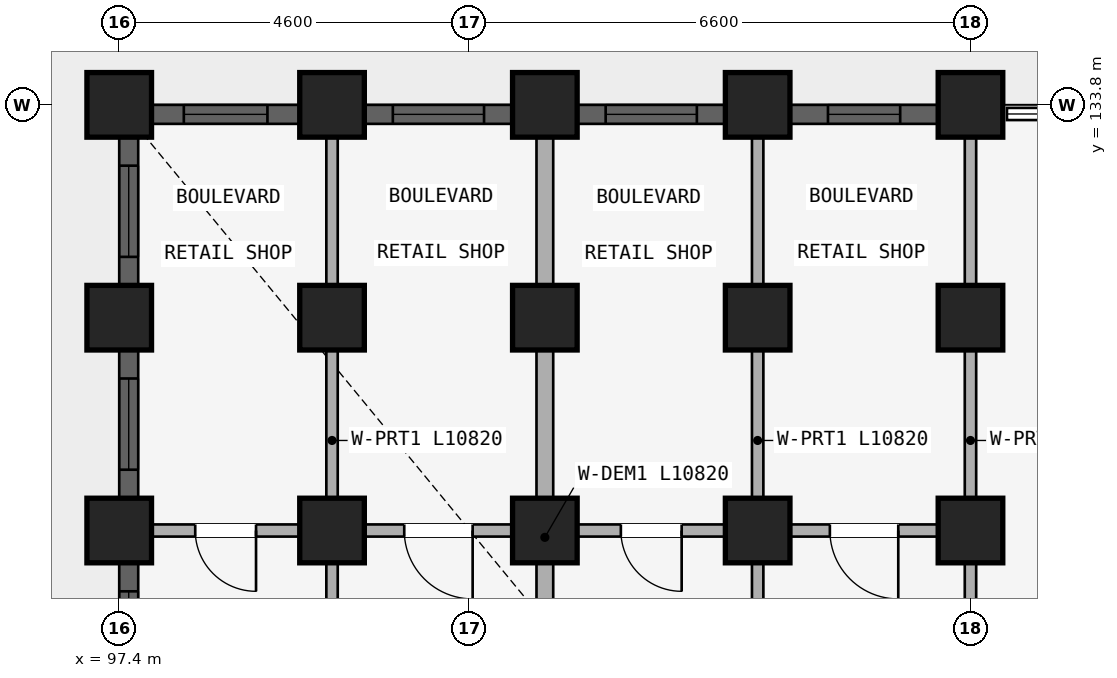
"""IFC4 building model, lengths in metres.
Left out: names, types, materials, properties, quantities, classifications, styles, units other than length and angle.
Written with IfcOpenShell. Run it as: python <this file> out.ifc"""

import sys

from ifc_helpers import new_model, si_unit, direction, frame, frame_2d, origin, origin_2d, place, context, subcontext, project, spatial, rectangle, extrude, element, fill, save


model = new_model("IFC4")
c1 = context("Model", 3, precision=1e-05, world=origin(), true_north=direction((0.0, 1.0)))
c2 = subcontext(c1, "Body", "Model", "MODEL_VIEW")
j1 = project(units=[si_unit("LENGTHUNIT", "METRE"), si_unit("PLANEANGLEUNIT", "RADIAN")], contexts=[c1])
p1 = place(None, origin())
s1 = spatial("IfcSite", under=j1, at=p1, CompositionType="ELEMENT")
p2 = place(p1, origin())
s2 = spatial("IfcBuilding", under=s1, at=p2, CompositionType="ELEMENT")
p3 = place(p2, origin())
s3 = spatial("IfcBuildingStorey", under=s2, at=p3, CompositionType="ELEMENT", Elevation=0.0)
for number, where, z_axis, x_axis in (
    (1, (108.6, 128.2, 0.0), (0.0, 0.0, 1.0), (1.0, 0.0, 0.0)),
    (2, (108.6, 131.0, 0.0), (0.0, 0.0, 1.0), (1.0, 0.0, 0.0)),
    (3, (108.6, 133.8, 0.0), (0.0, 0.0, 1.0), (1.0, 0.0, 0.0)),
    (4, (105.8, 128.2, 0.0), (0.0, 0.0, 1.0), (1.0, 0.0, 0.0)),
    (5, (105.8, 131.0, 0.0), (0.0, 0.0, 1.0), (1.0, 0.0, 0.0)),
    (6, (105.8, 133.8, 0.0), (0.0, 0.0, 1.0), (1.0, 0.0, 0.0)),
    (7, (103.0, 128.2, 0.0), (0.0, 0.0, 1.0), (1.0, 0.0, 0.0)),
    (8, (103.0, 131.0, 0.0), (0.0, 0.0, 1.0), (1.0, 0.0, 0.0)),
    (9, (103.0, 133.8, 0.0), (0.0, 0.0, 1.0), (1.0, 0.0, 0.0)),
    (10, (100.2, 128.2, 0.0), (0.0, 0.0, 1.0), (1.0, 0.0, 0.0)),
    (11, (100.2, 131.0, 0.0), (0.0, 0.0, 1.0), (1.0, 0.0, 0.0)),
    (12, (100.2, 133.8, 0.0), (0.0, 0.0, 1.0), (1.0, 0.0, 0.0)),
    (13, (97.4, 128.2, 0.0), (0.0, 0.0, 1.0), (1.0, 0.0, 0.0)),
    (14, (97.4, 131.0, 0.0), (0.0, 0.0, 1.0), (1.0, 0.0, 0.0)),
    (15, (97.4, 133.8, 0.0), (0.0, 0.0, 1.0), (1.0, 0.0, 0.0)),
):
    element("IfcColumn", number, at=place(p3, frame(where, z_axis=z_axis, x_axis=x_axis)), inside=s3, PredefinedType="COLUMN", context=c2, shape_type="SweptSolid", body=[
        extrude(rectangle(XDim=0.85, YDim=0.85, at=origin_2d()), origin(), (0.0, 0.0, 1.0), 4.15),
    ])
p4 = place(p3, frame((108.52, 128.2, 0.0), z_axis=(0.0, 0.0, 1.0), x_axis=(-1.0, 0.0, 0.0)))
e16 = element("IfcWall", 16, at=p4, inside=s3, PredefinedType="PLUMBINGWALL", context=c2, shape_type="SweptSolid", body=[
    extrude(rectangle(XDim=2.64, YDim=0.16, at=frame_2d((1.32, 0.0))), origin(), (0.0, 0.0, 1.0), 3.492),
])
p5 = place(p4, frame((0.87, 0.0, 0.0)))
e17 = element("IfcOpeningElement", 17, at=p5, cuts=e16, PredefinedType="OPENING", context=c2, shape_type="SweptSolid", body=[
    extrude(rectangle(XDim=0.9, YDim=2.1, at=frame_2d((0.45, 1.05))), frame((0.0, 0.09, 0.0), z_axis=(0.0, -1.0, 0.0), x_axis=(1.0, 0.0, 0.0)), (0.0, 0.0, 1.0), 0.18),
])
p6 = place(p3, frame((105.72, 128.2, 0.0), z_axis=(0.0, 0.0, 1.0), x_axis=(-1.0, 0.0, 0.0)))
e18 = element("IfcWall", 18, at=p6, inside=s3, PredefinedType="PLUMBINGWALL", context=c2, shape_type="SweptSolid", body=[
    extrude(rectangle(XDim=2.64, YDim=0.16, at=frame_2d((1.32, 0.0))), origin(), (0.0, 0.0, 1.0), 3.492),
])
p7 = place(p6, frame((0.92, 0.0, 0.0)))
e19 = element("IfcOpeningElement", 19, at=p7, cuts=e18, PredefinedType="OPENING", context=c2, shape_type="SweptSolid", body=[
    extrude(rectangle(XDim=0.8, YDim=2.1, at=frame_2d((0.4, 1.05))), frame((0.0, 0.09, 0.0), z_axis=(0.0, -1.0, 0.0), x_axis=(1.0, 0.0, 0.0)), (0.0, 0.0, 1.0), 0.18),
])
p8 = place(p3, frame((102.92, 128.2, 0.0), z_axis=(0.0, 0.0, 1.0), x_axis=(-1.0, 0.0, 0.0)))
e20 = element("IfcWall", 20, at=p8, inside=s3, PredefinedType="PLUMBINGWALL", context=c2, shape_type="SweptSolid", body=[
    extrude(rectangle(XDim=2.64, YDim=0.16, at=frame_2d((1.32, 0.0))), origin(), (0.0, 0.0, 1.0), 3.492),
])
p9 = place(p8, frame((0.87, 0.0, 0.0)))
e21 = element("IfcOpeningElement", 21, at=p9, cuts=e20, PredefinedType="OPENING", context=c2, shape_type="SweptSolid", body=[
    extrude(rectangle(XDim=0.9, YDim=2.1, at=frame_2d((0.45, 1.05))), frame((0.0, 0.09, 0.0), z_axis=(0.0, -1.0, 0.0), x_axis=(1.0, 0.0, 0.0)), (0.0, 0.0, 1.0), 0.18),
])
p10 = place(p3, frame((100.12, 128.2, 0.0), z_axis=(0.0, 0.0, 1.0), x_axis=(-1.0, 0.0, 0.0)))
e22 = element("IfcWall", 22, at=p10, inside=s3, PredefinedType="PLUMBINGWALL", context=c2, shape_type="SweptSolid", body=[
    extrude(rectangle(XDim=2.64, YDim=0.16, at=frame_2d((1.32, 0.0))), origin(), (0.0, 0.0, 1.0), 3.492),
])
p11 = place(p10, frame((0.92, 0.0, 0.0)))
e23 = element("IfcOpeningElement", 23, at=p11, cuts=e22, PredefinedType="OPENING", context=c2, shape_type="SweptSolid", body=[
    extrude(rectangle(XDim=0.8, YDim=2.1, at=frame_2d((0.4, 1.05))), frame((0.0, 0.09, 0.0), z_axis=(0.0, -1.0, 0.0), x_axis=(1.0, 0.0, 0.0)), (0.0, 0.0, 1.0), 0.18),
])
p12 = place(p3, frame((108.6, 122.7, 0.0), z_axis=(0.0, 0.0, 1.0), x_axis=(0.0, 1.0, 0.0)))
e24 = element("IfcWall", 24, at=p12, inside=s3, PredefinedType="PARTITIONING", context=c2, shape_type="SweptSolid", body=[
    extrude(rectangle(XDim=10.82, YDim=0.15, at=frame_2d((5.41, 0.0))), origin(), (0.0, 0.0, 1.0), 3.492),
])
p13 = place(p12, frame((0.899, 0.0, 0.0)))
e25 = element("IfcOpeningElement", 25, at=p13, cuts=e24, PredefinedType="OPENING", context=c2, shape_type="SweptSolid", body=[
    extrude(rectangle(XDim=0.8, YDim=2.1, at=frame_2d((0.4, 1.05))), frame((0.0, 0.085, 0.0), z_axis=(0.0, -1.0, 0.0), x_axis=(1.0, 0.0, 0.0)), (0.0, 0.0, 1.0), 0.17),
])
p14 = place(p3, frame((105.8, 122.7, 0.0), z_axis=(0.0, 0.0, 1.0), x_axis=(0.0, 1.0, 0.0)))
e26 = element("IfcWall", 26, at=p14, inside=s3, PredefinedType="PARTITIONING", context=c2, shape_type="SweptSolid", body=[
    extrude(rectangle(XDim=10.82, YDim=0.15, at=frame_2d((5.41, 0.0))), origin(), (0.0, 0.0, 1.0), 3.492),
])
p15 = place(p14, frame((0.899, 0.0, 0.0)))
e27 = element("IfcOpeningElement", 27, at=p15, cuts=e26, PredefinedType="OPENING", context=c2, shape_type="SweptSolid", body=[
    extrude(rectangle(XDim=0.8, YDim=2.1, at=frame_2d((0.4, 1.05))), frame((0.0, 0.085, 0.0), z_axis=(0.0, -1.0, 0.0), x_axis=(1.0, 0.0, 0.0)), (0.0, 0.0, 1.0), 0.17),
])
p16 = place(p3, frame((103.0, 122.7, 0.0), z_axis=(0.0, 0.0, 1.0), x_axis=(0.0, 1.0, 0.0)))
e28 = element("IfcWall", 28, at=p16, inside=s3, PredefinedType="STANDARD", context=c2, shape_type="SweptSolid", body=[
    extrude(rectangle(XDim=10.82, YDim=0.22, at=frame_2d((5.41, 0.0))), origin(), (0.0, 0.0, 1.0), 3.492),
])
p17 = place(p3, frame((100.2, 122.7, 0.0), z_axis=(0.0, 0.0, 1.0), x_axis=(0.0, 1.0, 0.0)))
e29 = element("IfcWall", 29, at=p17, inside=s3, PredefinedType="PARTITIONING", context=c2, shape_type="SweptSolid", body=[
    extrude(rectangle(XDim=10.82, YDim=0.15, at=frame_2d((5.41, 0.0))), origin(), (0.0, 0.0, 1.0), 3.492),
])
p18 = place(p17, frame((0.899, 0.0, 0.0)))
e30 = element("IfcOpeningElement", 30, at=p18, cuts=e29, PredefinedType="OPENING", context=c2, shape_type="SweptSolid", body=[
    extrude(rectangle(XDim=0.8, YDim=2.1, at=frame_2d((0.4, 1.05))), frame((0.0, 0.085, 0.0), z_axis=(0.0, -1.0, 0.0), x_axis=(1.0, 0.0, 0.0)), (0.0, 0.0, 1.0), 0.17),
])
p19 = place(p3, frame((108.171, 133.675, 0.0), z_axis=(0.0, 0.0, 1.0), x_axis=(-1.0, 0.0, 0.0)))
e31 = element("IfcWall", 31, at=p19, inside=s3, PredefinedType="STANDARD", context=c2, shape_type="SweptSolid", body=[
    extrude(rectangle(XDim=1.943, YDim=0.25, at=frame_2d((0.971, 0.0))), origin(), (0.0, 0.0, 1.0), 3.692),
])
p20 = place(p19, frame((0.497, 0.0, 0.88)))
e32 = element("IfcOpeningElement", 32, at=p20, cuts=e31, PredefinedType="OPENING", context=c2, shape_type="SweptSolid", body=[
    extrude(rectangle(XDim=0.95, YDim=1.35, at=frame_2d((0.475, 0.675))), frame((0.0, 0.135, 0.0), z_axis=(0.0, -1.0, 0.0), x_axis=(1.0, 0.0, 0.0)), (0.0, 0.0, 1.0), 0.27),
])
p21 = place(p3, frame((105.372, 133.675, 0.0), z_axis=(0.0, 0.0, 1.0), x_axis=(-1.0, 0.0, 0.0)))
e33 = element("IfcWall", 33, at=p21, inside=s3, PredefinedType="STANDARD", context=c2, shape_type="SweptSolid", body=[
    extrude(rectangle(XDim=1.943, YDim=0.25, at=frame_2d((0.972, 0.0))), origin(), (0.0, 0.0, 1.0), 3.692),
])
p22 = place(p21, frame((0.372, 0.0, 0.88)))
e34 = element("IfcOpeningElement", 34, at=p22, cuts=e33, PredefinedType="OPENING", context=c2, shape_type="SweptSolid", body=[
    extrude(rectangle(XDim=1.2, YDim=1.5, at=frame_2d((0.6, 0.75))), frame((0.0, 0.135, 0.0), z_axis=(0.0, -1.0, 0.0), x_axis=(1.0, 0.0, 0.0)), (0.0, 0.0, 1.0), 0.27),
])
p23 = place(p3, frame((102.572, 133.675, 0.0), z_axis=(0.0, 0.0, 1.0), x_axis=(-1.0, 0.0, 0.0)))
e35 = element("IfcWall", 35, at=p23, inside=s3, PredefinedType="STANDARD", context=c2, shape_type="SweptSolid", body=[
    extrude(rectangle(XDim=1.943, YDim=0.25, at=frame_2d((0.972, 0.0))), origin(), (0.0, 0.0, 1.0), 3.692),
])
p24 = place(p23, frame((0.372, 0.0, 0.88)))
e36 = element("IfcOpeningElement", 36, at=p24, cuts=e35, PredefinedType="OPENING", context=c2, shape_type="SweptSolid", body=[
    extrude(rectangle(XDim=1.2, YDim=1.5, at=frame_2d((0.6, 0.75))), frame((0.0, 0.135, 0.0), z_axis=(0.0, -1.0, 0.0), x_axis=(1.0, 0.0, 0.0)), (0.0, 0.0, 1.0), 0.27),
])
p25 = place(p3, frame((99.771, 133.675, 0.0), z_axis=(0.0, 0.0, 1.0), x_axis=(-1.0, 0.0, 0.0)))
e37 = element("IfcWall", 37, at=p25, inside=s3, PredefinedType="STANDARD", context=c2, shape_type="SweptSolid", body=[
    extrude(rectangle(XDim=1.943, YDim=0.25, at=frame_2d((0.971, 0.0))), origin(), (0.0, 0.0, 1.0), 3.692),
])
p26 = place(p25, frame((0.421, 0.0, 0.88)))
e38 = element("IfcOpeningElement", 38, at=p26, cuts=e37, PredefinedType="OPENING", context=c2, shape_type="SweptSolid", body=[
    extrude(rectangle(XDim=1.1, YDim=1.45, at=frame_2d((0.55, 0.725))), frame((0.0, 0.135, 0.0), z_axis=(0.0, -1.0, 0.0), x_axis=(1.0, 0.0, 0.0)), (0.0, 0.0, 1.0), 0.27),
])
p27 = place(p3, frame((97.525, 125.82, 0.0), z_axis=(0.0, 0.0, 1.0), x_axis=(0.0, 1.0, 0.0)))
e39 = element("IfcWall", 39, at=p27, inside=s3, PredefinedType="STANDARD", context=c2, shape_type="SweptSolid", body=[
    extrude(rectangle(XDim=1.96, YDim=0.25, at=frame_2d((0.98, 0.0))), origin(), (0.0, 0.0, 1.0), 3.492),
])
p28 = place(p27, frame((0.38, 0.0, 0.88)))
e40 = element("IfcOpeningElement", 40, at=p28, cuts=e39, PredefinedType="OPENING", context=c2, shape_type="SweptSolid", body=[
    extrude(rectangle(XDim=1.2, YDim=1.5, at=frame_2d((0.6, 0.75))), frame((0.0, 0.135, 0.0), z_axis=(0.0, -1.0, 0.0), x_axis=(1.0, 0.0, 0.0)), (0.0, 0.0, 1.0), 0.27),
])
p29 = place(p3, frame((97.525, 128.62, 0.0), z_axis=(0.0, 0.0, 1.0), x_axis=(0.0, 1.0, 0.0)))
e41 = element("IfcWall", 41, at=p29, inside=s3, PredefinedType="STANDARD", context=c2, shape_type="SweptSolid", body=[
    extrude(rectangle(XDim=1.96, YDim=0.25, at=frame_2d((0.98, 0.0))), origin(), (0.0, 0.0, 1.0), 3.492),
])
p30 = place(p29, frame((0.38, 0.0, 0.88)))
e42 = element("IfcOpeningElement", 42, at=p30, cuts=e41, PredefinedType="OPENING", context=c2, shape_type="SweptSolid", body=[
    extrude(rectangle(XDim=1.2, YDim=1.5, at=frame_2d((0.6, 0.75))), frame((0.0, 0.135, 0.0), z_axis=(0.0, -1.0, 0.0), x_axis=(1.0, 0.0, 0.0)), (0.0, 0.0, 1.0), 0.27),
])
p31 = place(p3, frame((97.525, 131.42, 0.0), z_axis=(0.0, 0.0, 1.0), x_axis=(0.0, 1.0, 0.0)))
e43 = element("IfcWall", 43, at=p31, inside=s3, PredefinedType="STANDARD", context=c2, shape_type="SweptSolid", body=[
    extrude(rectangle(XDim=1.96, YDim=0.25, at=frame_2d((0.98, 0.0))), origin(), (0.0, 0.0, 1.0), 3.492),
])
p32 = place(p31, frame((0.38, 0.0, 0.88)))
e44 = element("IfcOpeningElement", 44, at=p32, cuts=e43, PredefinedType="OPENING", context=c2, shape_type="SweptSolid", body=[
    extrude(rectangle(XDim=1.2, YDim=1.5, at=frame_2d((0.6, 0.75))), frame((0.0, 0.135, 0.0), z_axis=(0.0, -1.0, 0.0), x_axis=(1.0, 0.0, 0.0)), (0.0, 0.0, 1.0), 0.27),
])
p33 = place(p20, origin())
e45 = element("IfcWindow", 45, at=p33, inside=s3, PartitioningType="SINGLE_PANEL", PredefinedType="WINDOW", context=c2, shape_type="SweptSolid", body=[
    extrude(rectangle(XDim=0.95, YDim=1.35, at=frame_2d((0.475, 0.675))), frame((0.0, 0.03, 0.0), z_axis=(0.0, -1.0, 0.0), x_axis=(1.0, 0.0, 0.0)), (0.0, 0.0, 1.0), 0.06),
])
fill(e32, e45)
p34 = place(p22, origin())
e46 = element("IfcWindow", 46, at=p34, inside=s3, PartitioningType="SINGLE_PANEL", PredefinedType="WINDOW", context=c2, shape_type="SweptSolid", body=[
    extrude(rectangle(XDim=1.2, YDim=1.5, at=frame_2d((0.6, 0.75))), frame((0.0, 0.03, 0.0), z_axis=(0.0, -1.0, 0.0), x_axis=(1.0, 0.0, 0.0)), (0.0, 0.0, 1.0), 0.06),
])
fill(e34, e46)
p35 = place(p24, origin())
e47 = element("IfcWindow", 47, at=p35, inside=s3, PartitioningType="SINGLE_PANEL", PredefinedType="WINDOW", context=c2, shape_type="SweptSolid", body=[
    extrude(rectangle(XDim=1.2, YDim=1.5, at=frame_2d((0.6, 0.75))), frame((0.0, 0.03, 0.0), z_axis=(0.0, -1.0, 0.0), x_axis=(1.0, 0.0, 0.0)), (0.0, 0.0, 1.0), 0.06),
])
fill(e36, e47)
p36 = place(p26, origin())
e48 = element("IfcWindow", 48, at=p36, inside=s3, PartitioningType="SINGLE_PANEL", PredefinedType="WINDOW", context=c2, shape_type="SweptSolid", body=[
    extrude(rectangle(XDim=1.1, YDim=1.45, at=frame_2d((0.55, 0.725))), frame((0.0, 0.03, 0.0), z_axis=(0.0, -1.0, 0.0), x_axis=(1.0, 0.0, 0.0)), (0.0, 0.0, 1.0), 0.06),
])
fill(e38, e48)
p37 = place(p28, origin())
e49 = element("IfcWindow", 49, at=p37, inside=s3, PartitioningType="SINGLE_PANEL", PredefinedType="WINDOW", context=c2, shape_type="SweptSolid", body=[
    extrude(rectangle(XDim=1.2, YDim=1.5, at=frame_2d((0.6, 0.75))), frame((0.0, 0.03, 0.0), z_axis=(0.0, -1.0, 0.0), x_axis=(1.0, 0.0, 0.0)), (0.0, 0.0, 1.0), 0.06),
])
fill(e40, e49)
p38 = place(p30, origin())
e50 = element("IfcWindow", 50, at=p38, inside=s3, PartitioningType="SINGLE_PANEL", PredefinedType="WINDOW", context=c2, shape_type="SweptSolid", body=[
    extrude(rectangle(XDim=1.2, YDim=1.5, at=frame_2d((0.6, 0.75))), frame((0.0, 0.03, 0.0), z_axis=(0.0, -1.0, 0.0), x_axis=(1.0, 0.0, 0.0)), (0.0, 0.0, 1.0), 0.06),
])
fill(e42, e50)
p39 = place(p32, origin())
e51 = element("IfcWindow", 51, at=p39, inside=s3, PartitioningType="SINGLE_PANEL", PredefinedType="WINDOW", context=c2, shape_type="SweptSolid", body=[
    extrude(rectangle(XDim=1.2, YDim=1.5, at=frame_2d((0.6, 0.75))), frame((0.0, 0.03, 0.0), z_axis=(0.0, -1.0, 0.0), x_axis=(1.0, 0.0, 0.0)), (0.0, 0.0, 1.0), 0.06),
])
fill(e44, e51)
p40 = place(p5, origin())
e52 = element("IfcDoor", 52, at=p40, inside=s3, OperationType="SINGLE_SWING_LEFT", PredefinedType="DOOR", context=c2, shape_type="SweptSolid", body=[
    extrude(rectangle(XDim=0.9, YDim=2.1, at=frame_2d((0.45, 1.05))), frame((0.0, 0.025, 0.0), z_axis=(0.0, -1.0, 0.0), x_axis=(1.0, 0.0, 0.0)), (0.0, 0.0, 1.0), 0.05),
])
fill(e17, e52)
p41 = place(p7, origin())
e53 = element("IfcDoor", 53, at=p41, inside=s3, OperationType="SINGLE_SWING_LEFT", PredefinedType="DOOR", context=c2, shape_type="SweptSolid", body=[
    extrude(rectangle(XDim=0.8, YDim=2.1, at=frame_2d((0.4, 1.05))), frame((0.0, 0.025, 0.0), z_axis=(0.0, -1.0, 0.0), x_axis=(1.0, 0.0, 0.0)), (0.0, 0.0, 1.0), 0.05),
])
fill(e19, e53)
p42 = place(p9, origin())
e54 = element("IfcDoor", 54, at=p42, inside=s3, OperationType="SINGLE_SWING_LEFT", PredefinedType="DOOR", context=c2, shape_type="SweptSolid", body=[
    extrude(rectangle(XDim=0.9, YDim=2.1, at=frame_2d((0.45, 1.05))), frame((0.0, 0.025, 0.0), z_axis=(0.0, -1.0, 0.0), x_axis=(1.0, 0.0, 0.0)), (0.0, 0.0, 1.0), 0.05),
])
fill(e21, e54)
p43 = place(p11, origin())
e55 = element("IfcDoor", 55, at=p43, inside=s3, OperationType="SINGLE_SWING_LEFT", PredefinedType="DOOR", context=c2, shape_type="SweptSolid", body=[
    extrude(rectangle(XDim=0.8, YDim=2.1, at=frame_2d((0.4, 1.05))), frame((0.0, 0.025, 0.0), z_axis=(0.0, -1.0, 0.0), x_axis=(1.0, 0.0, 0.0)), (0.0, 0.0, 1.0), 0.05),
])
fill(e23, e55)
save(model, sys.argv[1])
